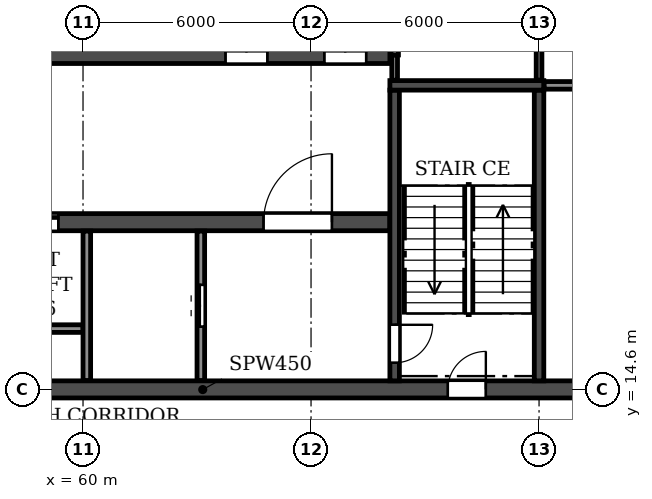
"""IFC4 building model, lengths in metres.
Left out: names, types, materials, properties, quantities, classifications, styles, units other than length and angle.
Written with IfcOpenShell. Run it as: python <this file> out.ifc"""

import sys

from ifc_helpers import new_model, si_unit, direction, frame, frame_2d, origin, place, context, subcontext, project, spatial, rectangle, extrude, element, fill, save


model = new_model("IFC4")
c1 = context("Model", 3, precision=1e-05, world=origin(), true_north=direction((0.0, 1.0)))
c2 = subcontext(c1, "Body", "Model", "MODEL_VIEW")
j1 = project(units=[si_unit("LENGTHUNIT", "METRE"), si_unit("PLANEANGLEUNIT", "RADIAN")], contexts=[c1])
p1 = place(None, origin())
s1 = spatial("IfcSite", under=j1, at=p1, CompositionType="ELEMENT")
p2 = place(p1, origin())
s2 = spatial("IfcBuilding", under=s1, at=p2, CompositionType="ELEMENT")
p3 = place(p2, frame((0.0, 0.0, 6.0)))
s3 = spatial("IfcBuildingStorey", under=s2, at=p3, CompositionType="ELEMENT", Elevation=6.0)
p4 = place(p3, frame((18.0, 14.6, 0.0), z_axis=(0.0, 0.0, 1.0), x_axis=(1.0, 0.0, 0.0)))
e1 = element("IfcWall", 1, at=p4, inside=s3, PredefinedType="SOLIDWALL", context=c2, shape_type="SweptSolid", body=[
    extrude(rectangle(XDim=66.0, YDim=0.45, at=frame_2d((33.0, 0.0))), origin(), (0.0, 0.0, 1.0), 4.52),
])
p5 = place(p4, frame((0.9, 0.0, 0.0)))
e2 = element("IfcOpeningElement", 2, at=p5, cuts=e1, PredefinedType="OPENING", context=c2, shape_type="SweptSolid", body=[
    extrude(rectangle(XDim=1.0, YDim=2.1, at=frame_2d((0.5, 1.05))), frame((0.0, 0.235, 0.0), z_axis=(0.0, -1.0, 0.0), x_axis=(1.0, 0.0, 0.0)), (0.0, 0.0, 1.0), 0.47),
])
p6 = place(p4, frame((8.8, 0.0, 0.0)))
e3 = element("IfcOpeningElement", 3, at=p6, cuts=e1, PredefinedType="OPENING", context=c2, shape_type="SweptSolid", body=[
    extrude(rectangle(XDim=1.0, YDim=2.1, at=frame_2d((0.5, 1.05))), frame((0.0, 0.235, 0.0), z_axis=(0.0, -1.0, 0.0), x_axis=(1.0, 0.0, 0.0)), (0.0, 0.0, 1.0), 0.47),
])
p7 = place(p4, frame((13.4, 0.0, 0.0)))
e4 = element("IfcOpeningElement", 4, at=p7, cuts=e1, PredefinedType="OPENING", context=c2, shape_type="SweptSolid", body=[
    extrude(rectangle(XDim=1.0, YDim=2.1, at=frame_2d((0.5, 1.05))), frame((0.0, 0.235, 0.0), z_axis=(0.0, -1.0, 0.0), x_axis=(1.0, 0.0, 0.0)), (0.0, 0.0, 1.0), 0.47),
])
p8 = place(p4, frame((26.0, 0.0, 0.0)))
e5 = element("IfcOpeningElement", 5, at=p8, cuts=e1, PredefinedType="OPENING", context=c2, shape_type="SweptSolid", body=[
    extrude(rectangle(XDim=1.0, YDim=2.1, at=frame_2d((0.5, 1.05))), frame((0.0, 0.235, 0.0), z_axis=(0.0, -1.0, 0.0), x_axis=(1.0, 0.0, 0.0)), (0.0, 0.0, 1.0), 0.47),
])
p9 = place(p4, frame((29.9, 0.0, 0.0)))
e6 = element("IfcOpeningElement", 6, at=p9, cuts=e1, PredefinedType="OPENING", context=c2, shape_type="SweptSolid", body=[
    extrude(rectangle(XDim=1.0, YDim=2.1, at=frame_2d((0.5, 1.05))), frame((0.0, 0.235, 0.0), z_axis=(0.0, -1.0, 0.0), x_axis=(1.0, 0.0, 0.0)), (0.0, 0.0, 1.0), 0.47),
])
p10 = place(p4, frame((32.5, 0.0, 0.0)))
e7 = element("IfcOpeningElement", 7, at=p10, cuts=e1, PredefinedType="OPENING", context=c2, shape_type="SweptSolid", body=[
    extrude(rectangle(XDim=1.0, YDim=2.1, at=frame_2d((0.5, 1.05))), frame((0.0, 0.235, 0.0), z_axis=(0.0, -1.0, 0.0), x_axis=(1.0, 0.0, 0.0)), (0.0, 0.0, 1.0), 0.47),
])
p11 = place(p4, frame((37.7, 0.0, 0.0)))
e8 = element("IfcOpeningElement", 8, at=p11, cuts=e1, PredefinedType="OPENING", context=c2, shape_type="SweptSolid", body=[
    extrude(rectangle(XDim=1.0, YDim=2.1, at=frame_2d((0.5, 1.05))), frame((0.0, 0.235, 0.0), z_axis=(0.0, -1.0, 0.0), x_axis=(1.0, 0.0, 0.0)), (0.0, 0.0, 1.0), 0.47),
])
p12 = place(p4, frame((51.6, 0.0, 0.0)))
e9 = element("IfcOpeningElement", 9, at=p12, cuts=e1, PredefinedType="OPENING", context=c2, shape_type="SweptSolid", body=[
    extrude(rectangle(XDim=1.0, YDim=2.1, at=frame_2d((0.5, 1.05))), frame((0.0, 0.235, 0.0), z_axis=(0.0, -1.0, 0.0), x_axis=(1.0, 0.0, 0.0)), (0.0, 0.0, 1.0), 0.47),
])
p13 = place(p4, frame((56.2, 0.0, 0.0)))
e10 = element("IfcOpeningElement", 10, at=p13, cuts=e1, PredefinedType="OPENING", context=c2, shape_type="SweptSolid", body=[
    extrude(rectangle(XDim=1.0, YDim=2.1, at=frame_2d((0.5, 1.05))), frame((0.0, 0.235, 0.0), z_axis=(0.0, -1.0, 0.0), x_axis=(1.0, 0.0, 0.0)), (0.0, 0.0, 1.0), 0.47),
])
p14 = place(p4, frame((64.1, 0.0, 0.0)))
e11 = element("IfcOpeningElement", 11, at=p14, cuts=e1, PredefinedType="OPENING", context=c2, shape_type="SweptSolid", body=[
    extrude(rectangle(XDim=1.0, YDim=2.1, at=frame_2d((0.5, 1.05))), frame((0.0, 0.235, 0.0), z_axis=(0.0, -1.0, 0.0), x_axis=(1.0, 0.0, 0.0)), (0.0, 0.0, 1.0), 0.47),
])
p15 = place(p3, frame((33.925, 19.0, 0.0), z_axis=(0.0, 0.0, 1.0), x_axis=(1.0, 0.0, 0.0)))
e12 = element("IfcWall", 12, at=p15, inside=s3, PredefinedType="SOLIDWALL", context=c2, shape_type="SweptSolid", body=[
    extrude(rectangle(XDim=34.15, YDim=0.45, at=frame_2d((17.075, 0.0))), origin(), (0.0, 0.0, 1.0), 4.52),
])
p16 = place(p15, frame((16.175, 0.0, 0.0)))
e13 = element("IfcOpeningElement", 13, at=p16, cuts=e12, PredefinedType="OPENING", context=c2, shape_type="SweptSolid", body=[
    extrude(rectangle(XDim=1.8, YDim=2.1, at=frame_2d((0.9, 1.05))), frame((0.0, 0.235, 0.0), z_axis=(0.0, -1.0, 0.0), x_axis=(1.0, 0.0, 0.0)), (0.0, 0.0, 1.0), 0.47),
])
p17 = place(p15, frame((1.525, 0.0, 0.0)))
e14 = element("IfcOpeningElement", 14, at=p17, cuts=e12, PredefinedType="OPENING", context=c2, shape_type="SweptSolid", body=[
    extrude(rectangle(XDim=1.8, YDim=2.1, at=frame_2d((0.9, 1.05))), frame((0.0, 0.235, 0.0), z_axis=(0.0, -1.0, 0.0), x_axis=(1.0, 0.0, 0.0)), (0.0, 0.0, 1.0), 0.47),
])
p18 = place(p15, frame((8.725, 0.0, 0.0)))
e15 = element("IfcOpeningElement", 15, at=p18, cuts=e12, PredefinedType="OPENING", context=c2, shape_type="SweptSolid", body=[
    extrude(rectangle(XDim=1.1, YDim=2.1, at=frame_2d((0.55, 1.05))), frame((0.0, 0.235, 0.0), z_axis=(0.0, -1.0, 0.0), x_axis=(1.0, 0.0, 0.0)), (0.0, 0.0, 1.0), 0.47),
])
p19 = place(p15, frame((11.325, 0.0, 0.0)))
e16 = element("IfcOpeningElement", 16, at=p19, cuts=e12, PredefinedType="OPENING", context=c2, shape_type="SweptSolid", body=[
    extrude(rectangle(XDim=1.1, YDim=2.1, at=frame_2d((0.55, 1.05))), frame((0.0, 0.235, 0.0), z_axis=(0.0, -1.0, 0.0), x_axis=(1.0, 0.0, 0.0)), (0.0, 0.0, 1.0), 0.47),
])
p20 = place(p15, frame((13.925, 0.0, 0.0)))
e17 = element("IfcOpeningElement", 17, at=p20, cuts=e12, PredefinedType="OPENING", context=c2, shape_type="SweptSolid", body=[
    extrude(rectangle(XDim=1.1, YDim=2.1, at=frame_2d((0.55, 1.05))), frame((0.0, 0.235, 0.0), z_axis=(0.0, -1.0, 0.0), x_axis=(1.0, 0.0, 0.0)), (0.0, 0.0, 1.0), 0.47),
])
p21 = place(p15, frame((19.125, 0.0, 0.0)))
e18 = element("IfcOpeningElement", 18, at=p21, cuts=e12, PredefinedType="OPENING", context=c2, shape_type="SweptSolid", body=[
    extrude(rectangle(XDim=1.1, YDim=2.1, at=frame_2d((0.55, 1.05))), frame((0.0, 0.235, 0.0), z_axis=(0.0, -1.0, 0.0), x_axis=(1.0, 0.0, 0.0)), (0.0, 0.0, 1.0), 0.47),
])
p22 = place(p15, frame((21.725, 0.0, 0.0)))
e19 = element("IfcOpeningElement", 19, at=p22, cuts=e12, PredefinedType="OPENING", context=c2, shape_type="SweptSolid", body=[
    extrude(rectangle(XDim=1.1, YDim=2.1, at=frame_2d((0.55, 1.05))), frame((0.0, 0.235, 0.0), z_axis=(0.0, -1.0, 0.0), x_axis=(1.0, 0.0, 0.0)), (0.0, 0.0, 1.0), 0.47),
])
p23 = place(p15, frame((24.325, 0.0, 0.0)))
e20 = element("IfcOpeningElement", 20, at=p23, cuts=e12, PredefinedType="OPENING", context=c2, shape_type="SweptSolid", body=[
    extrude(rectangle(XDim=1.1, YDim=2.1, at=frame_2d((0.55, 1.05))), frame((0.0, 0.235, 0.0), z_axis=(0.0, -1.0, 0.0), x_axis=(1.0, 0.0, 0.0)), (0.0, 0.0, 1.0), 0.47),
])
p24 = place(p15, frame((30.825, 0.0, 0.0)))
e21 = element("IfcOpeningElement", 21, at=p24, cuts=e12, PredefinedType="OPENING", context=c2, shape_type="SweptSolid", body=[
    extrude(rectangle(XDim=1.8, YDim=2.1, at=frame_2d((0.9, 1.05))), frame((0.0, 0.235, 0.0), z_axis=(0.0, -1.0, 0.0), x_axis=(1.0, 0.0, 0.0)), (0.0, 0.0, 1.0), 0.47),
])
p25 = place(p3, frame((33.925, 23.4, 0.0), z_axis=(0.0, 0.0, 1.0), x_axis=(1.0, 0.0, 0.0)))
e22 = element("IfcWall", 22, at=p25, inside=s3, PredefinedType="SOLIDWALL", context=c2, shape_type="SweptSolid", body=[
    extrude(rectangle(XDim=34.15, YDim=0.45, at=frame_2d((17.075, 0.0))), origin(), (0.0, 0.0, 1.0), 4.52),
])
p26 = place(p25, frame((16.175, 0.0, 0.0)))
e23 = element("IfcOpeningElement", 23, at=p26, cuts=e22, PredefinedType="OPENING", context=c2, shape_type="SweptSolid", body=[
    extrude(rectangle(XDim=1.8, YDim=2.1, at=frame_2d((0.9, 1.05))), frame((0.0, 0.235, 0.0), z_axis=(0.0, -1.0, 0.0), x_axis=(1.0, 0.0, 0.0)), (0.0, 0.0, 1.0), 0.47),
])
p27 = place(p25, frame((11.025, 0.0, 0.0)))
e24 = element("IfcOpeningElement", 24, at=p27, cuts=e22, PredefinedType="OPENING", context=c2, shape_type="SweptSolid", body=[
    extrude(rectangle(XDim=1.1, YDim=2.1, at=frame_2d((0.55, 1.05))), frame((0.0, 0.235, 0.0), z_axis=(0.0, -1.0, 0.0), x_axis=(1.0, 0.0, 0.0)), (0.0, 0.0, 1.0), 0.47),
])
p28 = place(p25, frame((29.825, 0.0, 0.0)))
e25 = element("IfcOpeningElement", 25, at=p28, cuts=e22, PredefinedType="OPENING", context=c2, shape_type="SweptSolid", body=[
    extrude(rectangle(XDim=1.1, YDim=2.1, at=frame_2d((0.55, 1.05))), frame((0.0, 0.235, 0.0), z_axis=(0.0, -1.0, 0.0), x_axis=(1.0, 0.0, 0.0)), (0.0, 0.0, 1.0), 0.47),
])
p29 = place(p25, frame((32.425, 0.0, 0.0)))
e26 = element("IfcOpeningElement", 26, at=p29, cuts=e22, PredefinedType="OPENING", context=c2, shape_type="SweptSolid", body=[
    extrude(rectangle(XDim=1.1, YDim=2.1, at=frame_2d((0.55, 1.05))), frame((0.0, 0.235, 0.0), z_axis=(0.0, -1.0, 0.0), x_axis=(1.0, 0.0, 0.0)), (0.0, 0.0, 1.0), 0.47),
])
p30 = place(p3, frame((68.2, 14.825, 0.0), z_axis=(0.0, 0.0, 1.0), x_axis=(0.0, 1.0, 0.0)))
e27 = element("IfcWall", 27, at=p30, inside=s3, PredefinedType="SOLIDWALL", context=c2, shape_type="SweptSolid", body=[
    extrude(rectangle(XDim=7.65, YDim=0.25, at=frame_2d((3.825, 0.0))), origin(), (0.0, 0.0, 1.0), 4.52),
])
p31 = place(p30, frame((0.475, 0.0, 0.0)))
e28 = element("IfcOpeningElement", 28, at=p31, cuts=e27, PredefinedType="OPENING", context=c2, shape_type="SweptSolid", body=[
    extrude(rectangle(XDim=1.0, YDim=2.1, at=frame_2d((0.5, 1.05))), frame((0.0, 0.135, 0.0), z_axis=(0.0, -1.0, 0.0), x_axis=(1.0, 0.0, 0.0)), (0.0, 0.0, 1.0), 0.27),
])
p32 = place(p3, frame((72.0, 14.825, 0.0), z_axis=(0.0, 0.0, 1.0), x_axis=(0.0, 1.0, 0.0)))
e29 = element("IfcWall", 29, at=p32, inside=s3, PredefinedType="SOLIDWALL", context=c2, shape_type="SweptSolid", body=[
    extrude(rectangle(XDim=7.65, YDim=0.25, at=frame_2d((3.825, 0.0))), origin(), (0.0, 0.0, 1.0), 4.52),
])
p33 = place(p3, frame((68.075, 22.6, 0.0), z_axis=(0.0, 0.0, 1.0), x_axis=(1.0, 0.0, 0.0)))
e30 = element("IfcWall", 30, at=p33, inside=s3, PredefinedType="SOLIDWALL", context=c2, shape_type="SweptSolid", body=[
    extrude(rectangle(XDim=4.05, YDim=0.25, at=frame_2d((2.025, 0.0))), origin(), (0.0, 0.0, 1.0), 4.52),
])
p34 = place(p3, frame((72.135, 22.6, 0.0), z_axis=(0.0, 0.0, 1.0), x_axis=(1.0, 0.0, 0.0)))
e31 = element("IfcWall", 31, at=p34, inside=s3, PredefinedType="PARTITIONING", context=c2, shape_type="SweptSolid", body=[
    extrude(rectangle(XDim=5.13, YDim=0.2, at=frame_2d((2.565, 0.0))), origin(), (0.0, 0.0, 1.0), 4.52),
])
p35 = place(p3, frame((68.2, 22.735, 0.0), z_axis=(0.0, 0.0, 1.0), x_axis=(0.0, 1.0, 0.0)))
e32 = element("IfcWall", 32, at=p35, inside=s3, PredefinedType="PARTITIONING", context=c2, shape_type="SweptSolid", body=[
    extrude(rectangle(XDim=0.665, YDim=0.15, at=frame_2d((0.333, 0.0))), origin(), (0.0, 0.0, 1.0), 4.52),
])
p36 = place(p3, frame((72.0, 22.735, 0.0), z_axis=(0.0, 0.0, 1.0), x_axis=(0.0, 1.0, 0.0)))
e33 = element("IfcWall", 33, at=p36, inside=s3, PredefinedType="PARTITIONING", context=c2, shape_type="SweptSolid", body=[
    extrude(rectangle(XDim=4.83, YDim=0.15, at=frame_2d((2.415, 0.0))), origin(), (0.0, 0.0, 1.0), 4.52),
])
p37 = place(p3, frame((52.2, 16.2, 0.0), z_axis=(0.0, 0.0, 1.0), x_axis=(1.0, 0.0, 0.0)))
e34 = element("IfcWall", 34, at=p37, inside=s3, PredefinedType="PARTITIONING", context=c2, shape_type="SweptSolid", body=[
    extrude(rectangle(XDim=7.8, YDim=0.2, at=frame_2d((3.9, 0.0))), origin(), (0.0, 0.0, 1.0), 4.52),
])
p38 = place(p3, frame((60.1, 14.835, 0.0), z_axis=(0.0, 0.0, 1.0), x_axis=(0.0, 1.0, 0.0)))
e35 = element("IfcWall", 35, at=p38, inside=s3, PredefinedType="PARTITIONING", context=c2, shape_type="SweptSolid", body=[
    extrude(rectangle(XDim=3.93, YDim=0.2, at=frame_2d((1.965, 0.0))), origin(), (0.0, 0.0, 1.0), 4.52),
])
p39 = place(p3, frame((63.1, 14.835, 0.0), z_axis=(0.0, 0.0, 1.0), x_axis=(0.0, 1.0, 0.0)))
e36 = element("IfcWall", 36, at=p39, inside=s3, PredefinedType="PARTITIONING", context=c2, shape_type="SweptSolid", body=[
    extrude(rectangle(XDim=3.93, YDim=0.2, at=frame_2d((1.965, 0.0))), origin(), (0.0, 0.0, 1.0), 4.52),
])
p40 = place(p39, frame((1.415, 0.0, 0.0)))
e37 = element("IfcOpeningElement", 37, at=p40, cuts=e36, PredefinedType="OPENING", context=c2, shape_type="SweptSolid", body=[
    extrude(rectangle(XDim=1.1, YDim=2.1, at=frame_2d((0.55, 1.05))), frame((0.0, 0.11, 0.0), z_axis=(0.0, -1.0, 0.0), x_axis=(1.0, 0.0, 0.0)), (0.0, 0.0, 1.0), 0.22),
])
p41 = place(p3, frame((68.2, 23.4, 0.0), z_axis=(0.0, 0.0, 1.0), x_axis=(0.0, 1.0, 0.0)))
e38 = element("IfcWall", 38, at=p41, inside=s3, PredefinedType="PARTITIONING", context=c2, shape_type="SweptSolid", body=[
    extrude(rectangle(XDim=2.7, YDim=0.2, at=frame_2d((1.35, 0.0))), origin(), (0.0, 0.0, 1.0), 4.52),
])
p42 = place(p12, origin())
e39 = element("IfcDoor", 39, at=p42, inside=s3, OperationType="SINGLE_SWING_RIGHT", PredefinedType="DOOR", context=c2, shape_type="SweptSolid", body=[
    extrude(rectangle(XDim=1.0, YDim=2.1, at=frame_2d((0.5, 1.05))), frame((0.0, 0.025, 0.0), z_axis=(0.0, -1.0, 0.0), x_axis=(1.0, 0.0, 0.0)), (0.0, 0.0, 1.0), 0.05),
])
fill(e9, e39)
p43 = place(p40, origin())
e40 = element("IfcDoor", 40, at=p43, inside=s3, OperationType="DOUBLE_DOOR_SLIDING", PredefinedType="DOOR", context=c2, shape_type="SweptSolid", body=[
    extrude(rectangle(XDim=1.1, YDim=2.1, at=frame_2d((0.55, 1.05))), frame((0.0, 0.025, 0.0), z_axis=(0.0, -1.0, 0.0), x_axis=(1.0, 0.0, 0.0)), (0.0, 0.0, 1.0), 0.05),
])
fill(e37, e40)
p44 = place(p31, frame((1.0, 0.0, 0.0), z_axis=(0.0, 0.0, 1.0), x_axis=(-1.0, 0.0, 0.0)))
e41 = element("IfcDoor", 41, at=p44, inside=s3, OperationType="SINGLE_SWING_LEFT", PredefinedType="DOOR", context=c2, shape_type="SweptSolid", body=[
    extrude(rectangle(XDim=1.0, YDim=2.1, at=frame_2d((0.5, 1.05))), frame((0.0, 0.025, 0.0), z_axis=(0.0, -1.0, 0.0), x_axis=(1.0, 0.0, 0.0)), (0.0, 0.0, 1.0), 0.05),
])
fill(e28, e41)
p45 = place(p23, origin())
e42 = element("IfcDoor", 42, at=p45, inside=s3, OperationType="DOUBLE_DOOR_SLIDING", PredefinedType="DOOR", context=c2, shape_type="SweptSolid", body=[
    extrude(rectangle(XDim=1.1, YDim=2.1, at=frame_2d((0.55, 1.05))), frame((0.0, 0.025, 0.0), z_axis=(0.0, -1.0, 0.0), x_axis=(1.0, 0.0, 0.0)), (0.0, 0.0, 1.0), 0.05),
])
fill(e20, e42)
p46 = place(p28, origin())
e43 = element("IfcDoor", 43, at=p46, inside=s3, OperationType="DOUBLE_DOOR_SLIDING", PredefinedType="DOOR", context=c2, shape_type="SweptSolid", body=[
    extrude(rectangle(XDim=1.1, YDim=2.1, at=frame_2d((0.55, 1.05))), frame((0.0, 0.025, 0.0), z_axis=(0.0, -1.0, 0.0), x_axis=(1.0, 0.0, 0.0)), (0.0, 0.0, 1.0), 0.05),
])
fill(e25, e43)
p47 = place(p24, origin())
e44 = element("IfcDoor", 44, at=p47, inside=s3, OperationType="DOUBLE_DOOR_SINGLE_SWING", PredefinedType="DOOR", context=c2, shape_type="SweptSolid", body=[
    extrude(rectangle(XDim=1.8, YDim=2.1, at=frame_2d((0.9, 1.05))), frame((0.0, 0.025, 0.0), z_axis=(0.0, -1.0, 0.0), x_axis=(1.0, 0.0, 0.0)), (0.0, 0.0, 1.0), 0.05),
])
fill(e21, e44)
p48 = place(p29, origin())
e45 = element("IfcDoor", 45, at=p48, inside=s3, OperationType="DOUBLE_DOOR_SLIDING", PredefinedType="DOOR", context=c2, shape_type="SweptSolid", body=[
    extrude(rectangle(XDim=1.1, YDim=2.1, at=frame_2d((0.55, 1.05))), frame((0.0, 0.025, 0.0), z_axis=(0.0, -1.0, 0.0), x_axis=(1.0, 0.0, 0.0)), (0.0, 0.0, 1.0), 0.05),
])
fill(e26, e45)
save(model, sys.argv[1])
